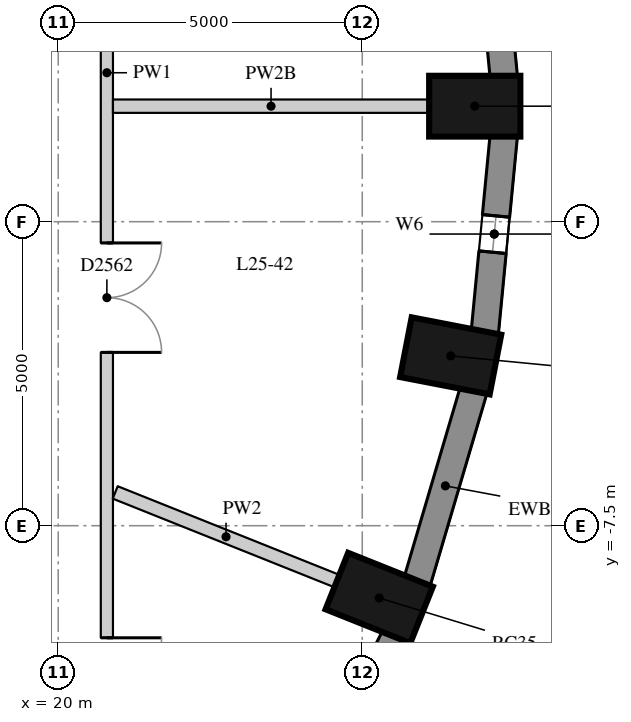
"""IFC4 building model, lengths in metres.
Left out: names, types, materials, properties, quantities, classifications, styles, units other than length and angle.
Written with IfcOpenShell. Run it as: python <this file> out.ifc"""

import sys

from ifc_helpers import new_model, si_unit, direction, frame, frame_2d, origin, origin_2d, place, context, subcontext, project, spatial, rectangle, extrude, element, fill, save


model = new_model("IFC4")
c1 = context("Model", 3, precision=1e-05, world=origin(), true_north=direction((0.0, 1.0)))
c2 = subcontext(c1, "Body", "Model", "MODEL_VIEW")
j1 = project(units=[si_unit("LENGTHUNIT", "METRE"), si_unit("PLANEANGLEUNIT", "RADIAN")], contexts=[c1])
p1 = place(None, origin())
s1 = spatial("IfcSite", under=j1, at=p1, CompositionType="ELEMENT")
p2 = place(p1, origin())
s2 = spatial("IfcBuilding", under=s1, at=p2, CompositionType="ELEMENT")
p3 = place(p2, frame((0.0, 0.0, 92.2)))
s3 = spatial("IfcBuildingStorey", under=s2, at=p3, CompositionType="ELEMENT", Elevation=92.2)
for number, where, z_axis, x_axis in (
    (1, (26.85, -0.6, 0.0), (0.0, 0.0, 1.0), (1.0, 0.0, 0.0)),
    (2, (25.279, -8.689, 0.0), (0.0, 0.0, 1.0), (0.929, -0.371, 0.0)),
    (3, (26.454, -4.707, 0.0), (0.0, 0.0, 1.0), (0.982, -0.19, 0.0)),
):
    element("IfcColumn", number, at=place(p3, frame(where, z_axis=z_axis, x_axis=x_axis)), inside=s3, PredefinedType="COLUMN", context=c2, shape_type="SweptSolid", body=[
        extrude(rectangle(XDim=1.5, YDim=1.0, at=origin_2d()), origin(), (0.0, 0.0, 1.0), 3.3),
    ])
p4 = place(p3, frame((27.328, -0.12, 0.0), z_axis=(0.0, 0.0, 1.0), x_axis=(-0.09589355735, 0.995391594127, 0.0)))
e4 = element("IfcWall", 4, at=p4, inside=s3, PredefinedType="SOLIDWALL", context=c2, shape_type="SweptSolid", body=[
    extrude(rectangle(XDim=3.261, YDim=0.45, at=frame_2d((1.631, 0.0))), origin(), (0.0, 0.0, 1.0), 3.02),
])
p5 = place(p3, frame((24.023, -12.277, 0.0), z_axis=(0.0, 0.0, 1.0), x_axis=(0.456828186229, 0.889554949549, 0.0)))
e5 = element("IfcWall", 5, at=p5, inside=s3, PredefinedType="SOLIDWALL", context=c2, shape_type="SweptSolid", body=[
    extrude(rectangle(XDim=3.333, YDim=0.45, at=frame_2d((1.667, 0.0))), origin(), (0.0, 0.0, 1.0), 3.02),
])
p6 = place(p5, frame((1.366, 0.0, 0.4)))
e6 = element("IfcOpeningElement", 6, at=p6, cuts=e5, PredefinedType="OPENING", context=c2, shape_type="SweptSolid", body=[
    extrude(rectangle(XDim=0.6, YDim=1.75, at=frame_2d((0.3, 0.875))), frame((0.0, 0.235, 0.0), z_axis=(0.0, -1.0, 0.0), x_axis=(1.0, 0.0, 0.0)), (0.0, 0.0, 1.0), 0.47),
])
p7 = place(p3, frame((25.902, -8.421, 0.0), z_axis=(0.0, 0.0, 1.0), x_axis=(0.282982737009, 0.95912500257, 0.0)))
e7 = element("IfcWall", 7, at=p7, inside=s3, PredefinedType="SOLIDWALL", context=c2, shape_type="SweptSolid", body=[
    extrude(rectangle(XDim=3.286, YDim=0.45, at=frame_2d((1.643, 0.0))), origin(), (0.0, 0.0, 1.0), 3.02),
])
p8 = place(p3, frame((27.015, -4.326, 0.0), z_axis=(0.0, 0.0, 1.0), x_axis=(0.09589355735, 0.995391594127, 0.0)))
e8 = element("IfcWall", 8, at=p8, inside=s3, PredefinedType="SOLIDWALL", context=c2, shape_type="SweptSolid", body=[
    extrude(rectangle(XDim=3.261, YDim=0.45, at=frame_2d((1.631, 0.0))), origin(), (0.0, 0.0, 1.0), 3.02),
])
p9 = place(p8, frame((1.331, 0.0, 0.4)))
e9 = element("IfcOpeningElement", 9, at=p9, cuts=e8, PredefinedType="OPENING", context=c2, shape_type="SweptSolid", body=[
    extrude(rectangle(XDim=0.6, YDim=1.75, at=frame_2d((0.3, 0.875))), frame((0.0, 0.235, 0.0), z_axis=(0.0, -1.0, 0.0), x_axis=(1.0, 0.0, 0.0)), (0.0, 0.0, 1.0), 0.47),
])
p10 = place(p3, frame((20.8, 13.5, 0.0), z_axis=(0.0, 0.0, 1.0), x_axis=(0.0, -1.0, 0.0)))
e10 = element("IfcWall", 10, at=p10, inside=s3, PredefinedType="PARTITIONING", context=c2, shape_type="SweptSolid", body=[
    extrude(rectangle(XDim=27.1, YDim=0.2, at=frame_2d((13.55, 0.0))), origin(), (0.0, 0.0, 1.0), 3.02),
])
p11 = place(p10, frame((22.844, 0.0, 0.0)))
e11 = element("IfcOpeningElement", 11, at=p11, cuts=e10, PredefinedType="OPENING", context=c2, shape_type="SweptSolid", body=[
    extrude(rectangle(XDim=1.8, YDim=2.1, at=frame_2d((0.9, 1.05))), frame((0.0, 0.11, 0.0), z_axis=(0.0, -1.0, 0.0), x_axis=(1.0, 0.0, 0.0)), (0.0, 0.0, 1.0), 0.22),
])
p12 = place(p10, frame((16.35, 0.0, 0.0)))
e12 = element("IfcOpeningElement", 12, at=p12, cuts=e10, PredefinedType="OPENING", context=c2, shape_type="SweptSolid", body=[
    extrude(rectangle(XDim=1.8, YDim=2.1, at=frame_2d((0.9, 1.05))), frame((0.0, 0.11, 0.0), z_axis=(0.0, -1.0, 0.0), x_axis=(1.0, 0.0, 0.0)), (0.0, 0.0, 1.0), 0.22),
])
p13 = place(p10, frame((7.996, 0.0, 0.0)))
e13 = element("IfcOpeningElement", 13, at=p13, cuts=e10, PredefinedType="OPENING", context=c2, shape_type="SweptSolid", body=[
    extrude(rectangle(XDim=1.8, YDim=2.1, at=frame_2d((0.9, 1.05))), frame((0.0, 0.11, 0.0), z_axis=(0.0, -1.0, 0.0), x_axis=(1.0, 0.0, 0.0)), (0.0, 0.0, 1.0), 0.22),
])
p14 = place(p3, frame((26.1, -0.6, 0.0), z_axis=(0.0, 0.0, 1.0), x_axis=(-1.0, 0.0, 0.0)))
e14 = element("IfcWall", 14, at=p14, inside=s3, PredefinedType="PARTITIONING", context=c2, shape_type="SweptSolid", body=[
    extrude(rectangle(XDim=5.2, YDim=0.22, at=frame_2d((2.6, 0.0))), origin(), (0.0, 0.0, 1.0), 2.57),
])
p15 = place(p3, frame((24.583, -8.41, 0.0), z_axis=(0.0, 0.0, 1.0), x_axis=(-0.928528147853, 0.371262008083, 0.0)))
e15 = element("IfcWall", 15, at=p15, inside=s3, PredefinedType="PARTITIONING", context=c2, shape_type="SweptSolid", body=[
    extrude(rectangle(XDim=3.926, YDim=0.22, at=frame_2d((1.963, 0.0))), origin(), (0.0, 0.0, 1.0), 3.02),
])
p16 = place(p9, origin())
e16 = element("IfcWindow", 16, at=p16, inside=s3, PartitioningType="SINGLE_PANEL", PredefinedType="WINDOW", context=c2, shape_type="SweptSolid", body=[
    extrude(rectangle(XDim=0.6, YDim=1.75, at=frame_2d((0.3, 0.875))), frame((0.0, 0.035, 0.0), z_axis=(0.0, -1.0, 0.0), x_axis=(1.0, 0.0, 0.0)), (0.0, 0.0, 1.0), 0.06),
])
fill(e9, e16)
p17 = place(p11, origin())
e17 = element("IfcDoor", 17, at=p17, inside=s3, OperationType="DOUBLE_DOOR_SINGLE_SWING", PredefinedType="DOOR", context=c2, shape_type="SweptSolid", body=[
    extrude(rectangle(XDim=1.8, YDim=2.1, at=frame_2d((0.9, 1.05))), frame((0.0, 0.025, 0.0), z_axis=(0.0, -1.0, 0.0), x_axis=(1.0, 0.0, 0.0)), (0.0, 0.0, 1.0), 0.05),
])
fill(e11, e17)
p18 = place(p12, origin())
e18 = element("IfcDoor", 18, at=p18, inside=s3, OperationType="DOUBLE_DOOR_SINGLE_SWING", PredefinedType="DOOR", context=c2, shape_type="SweptSolid", body=[
    extrude(rectangle(XDim=1.8, YDim=2.1, at=frame_2d((0.9, 1.05))), frame((0.0, 0.025, 0.0), z_axis=(0.0, -1.0, 0.0), x_axis=(1.0, 0.0, 0.0)), (0.0, 0.0, 1.0), 0.05),
])
fill(e12, e18)
save(model, sys.argv[1])
